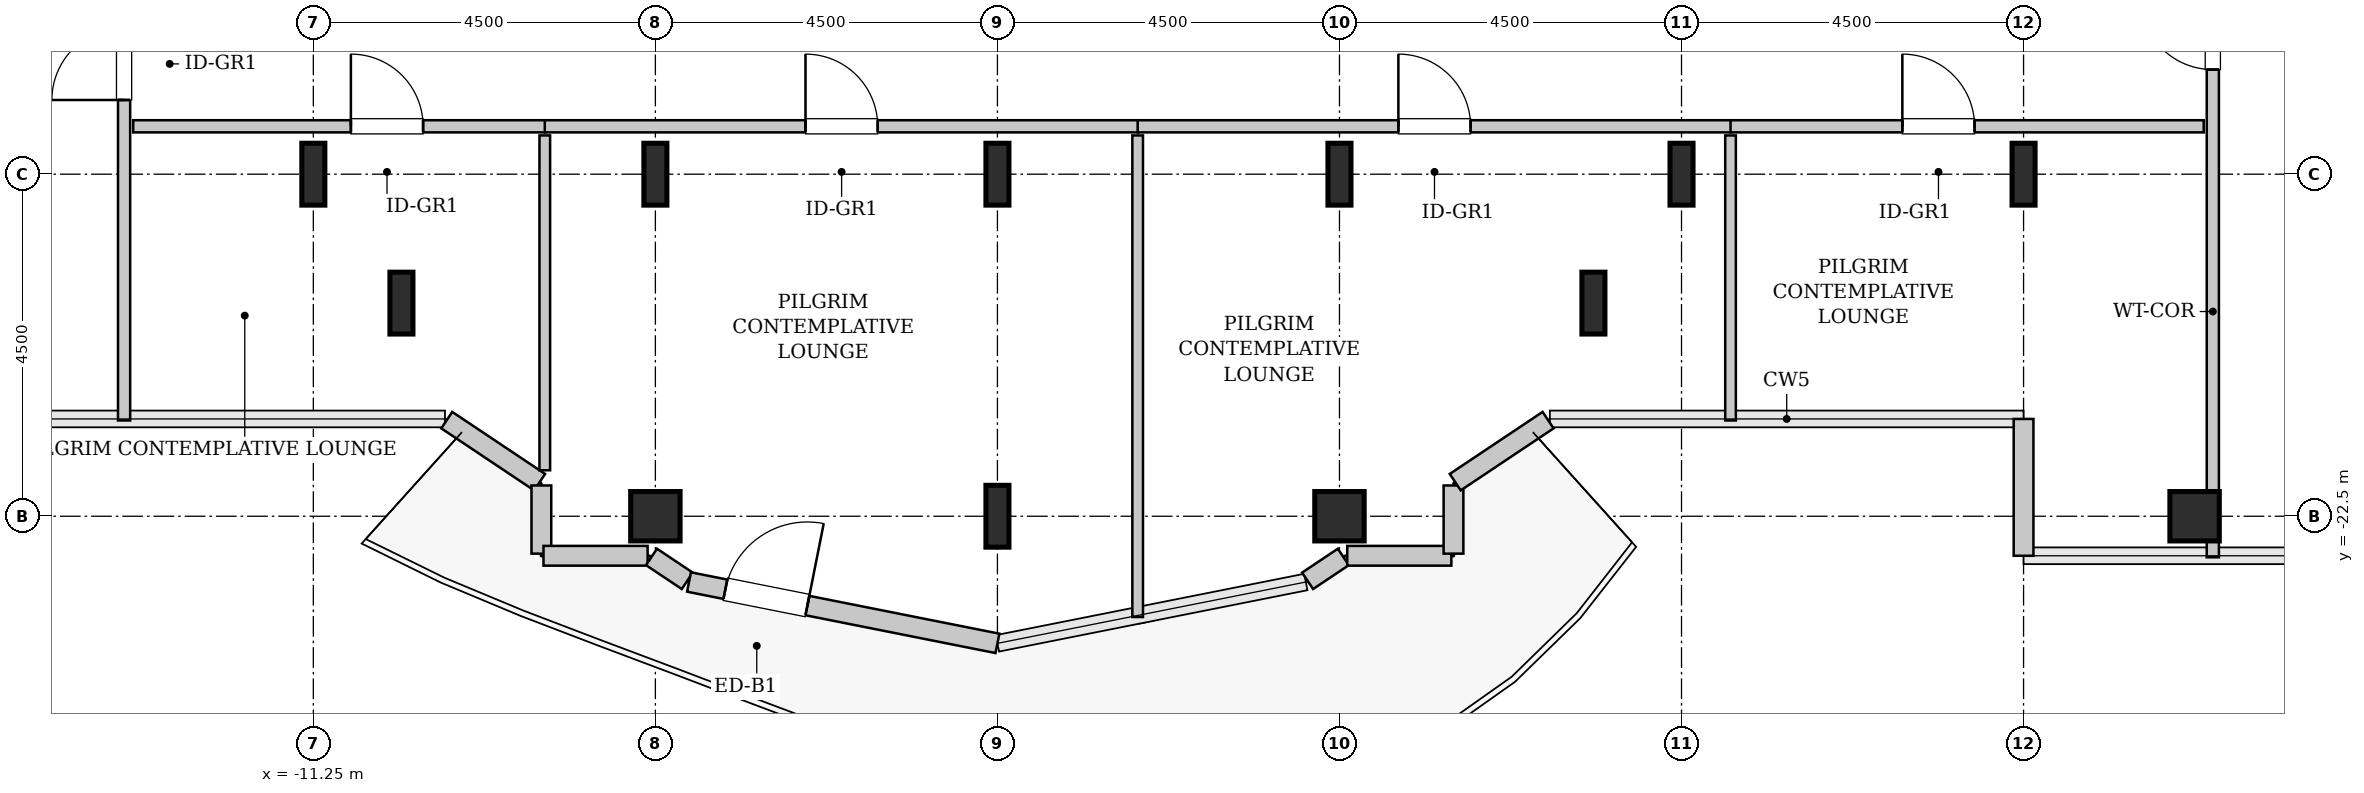
"""IFC4 building model, lengths in metres.
Left out: names, types, materials, properties, quantities, classifications, styles, units other than length and angle.
Written with IfcOpenShell. Run it as: python <this file> out.ifc"""

import sys

from ifc_helpers import new_model, si_unit, direction, frame, frame_2d, origin, origin_2d, place, context, subcontext, project, spatial, rectangle, hollow_rectangle, i_section, extrude, source, transform, mapped, element, fill, save


model = new_model("IFC4")
c1 = context("Model", 3, precision=1e-05, world=origin(), true_north=direction((0.0, 1.0)))
c2 = subcontext(c1, "Body", "Model", "MODEL_VIEW")
j1 = project(units=[si_unit("LENGTHUNIT", "METRE"), si_unit("PLANEANGLEUNIT", "RADIAN")], contexts=[c1])
p1 = place(None, origin())
s1 = spatial("IfcSite", under=j1, at=p1, CompositionType="ELEMENT")
p2 = place(p1, origin())
s2 = spatial("IfcBuilding", under=s1, at=p2, CompositionType="ELEMENT")
p3 = place(p2, frame((0.0, 0.0, 210.4)))
s3 = spatial("IfcBuildingStorey", under=s2, at=p3, CompositionType="ELEMENT", Elevation=210.4)
m1 = source(origin(), c2, "Body", "SweptSolid", [
    extrude(i_section(OverallWidth=0.303, OverallDepth=0.814, WebThickness=0.021, FlangeThickness=0.04, FilletRadius=0.03, at=origin_2d()), origin(), (0.0, 0.0, 1.0), 3.8),
])
for number, where, z_axis, x_axis in (
    (1, (-11.25, -18.0, 0.0), (0.0, 0.0, 1.0), (1.0, 0.0, 0.0)),
    (2, (-10.091, -19.696, 0.0), (0.0, 0.0, 1.0), (1.0, 0.0, 0.0)),
):
    element("IfcColumn", number, at=place(p3, frame(where, z_axis=z_axis, x_axis=x_axis)), inside=s3, PredefinedType="COLUMN", context=c2, shape_type="MappedRepresentation", body=[
        mapped(m1, transform((0.0, 0.0, 0.0), x_axis=(1.0, 0.0, 0.0), y_axis=(0.0, 1.0, 0.0), z_axis=(0.0, 0.0, 1.0), scale=1.0)),
    ])
m2 = source(origin(), c2, "Body", "SweptSolid", [
    extrude(hollow_rectangle(XDim=0.65, YDim=0.65, WallThickness=0.032, InnerFilletRadius=0.032, OuterFilletRadius=0.064, at=origin_2d()), origin(), (0.0, 0.0, 1.0), 3.8),
])
p4 = place(p3, frame((-6.75, -22.5, 0.0), z_axis=(0.0, 0.0, 1.0), x_axis=(1.0, 0.0, 0.0)))
e3 = element("IfcColumn", 3, at=p4, inside=s3, PredefinedType="COLUMN", context=c2, shape_type="MappedRepresentation", body=[
    mapped(m2, transform((0.0, 0.0, 0.0), x_axis=(1.0, 0.0, 0.0), y_axis=(0.0, 1.0, 0.0), z_axis=(0.0, 0.0, 1.0), scale=1.0)),
])
for number, where, z_axis, x_axis in (
    (4, (-6.75, -18.0, 0.0), (0.0, 0.0, 1.0), (1.0, 0.0, 0.0)),
    (5, (-2.25, -22.5, 0.0), (0.0, 0.0, 1.0), (1.0, 0.0, 0.0)),
    (6, (-2.25, -18.0, 0.0), (0.0, 0.0, 1.0), (1.0, 0.0, 0.0)),
):
    element("IfcColumn", number, at=place(p3, frame(where, z_axis=z_axis, x_axis=x_axis)), inside=s3, PredefinedType="COLUMN", context=c2, shape_type="MappedRepresentation", body=[
        mapped(m1, transform((0.0, 0.0, 0.0), x_axis=(1.0, 0.0, 0.0), y_axis=(0.0, 1.0, 0.0), z_axis=(0.0, 0.0, 1.0), scale=1.0)),
    ])
p5 = place(p3, frame((2.25, -22.5, 0.0), z_axis=(0.0, 0.0, 1.0), x_axis=(1.0, 0.0, 0.0)))
e7 = element("IfcColumn", 7, at=p5, inside=s3, PredefinedType="COLUMN", context=c2, shape_type="MappedRepresentation", body=[
    mapped(m2, transform((0.0, 0.0, 0.0), x_axis=(1.0, 0.0, 0.0), y_axis=(0.0, 1.0, 0.0), z_axis=(0.0, 0.0, 1.0), scale=1.0)),
])
for number, where, z_axis, x_axis in (
    (8, (2.25, -18.0, 0.0), (0.0, 0.0, 1.0), (1.0, 0.0, 0.0)),
    (9, (5.591, -19.696, 0.0), (0.0, 0.0, 1.0), (1.0, 0.0, 0.0)),
    (10, (6.75, -18.0, 0.0), (0.0, 0.0, 1.0), (1.0, 0.0, 0.0)),
    (11, (11.25, -18.0, 0.0), (0.0, 0.0, 1.0), (1.0, 0.0, 0.0)),
):
    element("IfcColumn", number, at=place(p3, frame(where, z_axis=z_axis, x_axis=x_axis)), inside=s3, PredefinedType="COLUMN", context=c2, shape_type="MappedRepresentation", body=[
        mapped(m1, transform((0.0, 0.0, 0.0), x_axis=(1.0, 0.0, 0.0), y_axis=(0.0, 1.0, 0.0), z_axis=(0.0, 0.0, 1.0), scale=1.0)),
    ])
p6 = place(p3, frame((13.5, -22.5, 0.0), z_axis=(0.0, 0.0, 1.0), x_axis=(1.0, 0.0, 0.0)))
e12 = element("IfcColumn", 12, at=p6, inside=s3, PredefinedType="COLUMN", context=c2, shape_type="MappedRepresentation", body=[
    mapped(m2, transform((0.0, 0.0, 0.0), x_axis=(1.0, 0.0, 0.0), y_axis=(0.0, 1.0, 0.0), z_axis=(0.0, 0.0, 1.0), scale=1.0)),
])
m3 = source(origin(), c2, "Body", "SweptSolid", [
    extrude(rectangle(XDim=1.8, YDim=0.26, at=frame_2d((0.9, 0.0))), origin(), (0.0, 0.0, 1.0), 3.55),
])
p7 = place(p3, frame((11.25, -21.22, 0.0), z_axis=(0.0, 0.0, 1.0), x_axis=(0.0, -1.0, 0.0)))
e13 = element("IfcWall", 13, at=p7, inside=s3, PredefinedType="SOLIDWALL", context=c2, shape_type="MappedRepresentation", body=[
    mapped(m3, transform((0.0, 0.0, 0.0), x_axis=(1.0, 0.0, 0.0), y_axis=(0.0, 1.0, 0.0), z_axis=(0.0, 0.0, 1.0), scale=1.0)),
])
m4 = source(origin(), c2, "Body", "SweptSolid", [
    extrude(rectangle(XDim=1.469, YDim=0.26, at=frame_2d((0.734, 0.0))), origin(), (0.0, 0.0, 1.0), 3.55),
])
p8 = place(p3, frame((-9.495, -21.236, 0.0), z_axis=(0.0, 0.0, 1.0), x_axis=(0.831461760506, -0.555581983884, 0.0)))
e14 = element("IfcWall", 14, at=p8, inside=s3, PredefinedType="SOLIDWALL", context=c2, shape_type="MappedRepresentation", body=[
    mapped(m4, transform((0.0, 0.0, 0.0), x_axis=(1.0, 0.0, 0.0), y_axis=(0.0, 1.0, 0.0), z_axis=(0.0, 0.0, 1.0), scale=1.0)),
])
m5 = source(origin(), c2, "Body", "SweptSolid", [
    extrude(rectangle(XDim=0.897, YDim=0.26, at=frame_2d((0.448, 0.0))), origin(), (0.0, 0.0, 1.0), 3.55),
])
p9 = place(p3, frame((-8.25, -22.095, 0.0), z_axis=(0.0, 0.0, 1.0), x_axis=(0.0, -1.0, 0.0)))
e15 = element("IfcWall", 15, at=p9, inside=s3, PredefinedType="SOLIDWALL", context=c2, shape_type="MappedRepresentation", body=[
    mapped(m5, transform((0.0, 0.0, 0.0), x_axis=(1.0, 0.0, 0.0), y_axis=(0.0, 1.0, 0.0), z_axis=(0.0, 0.0, 1.0), scale=1.0)),
])
m6 = source(origin(), c2, "Body", "SweptSolid", [
    extrude(rectangle(XDim=1.37, YDim=0.26, at=frame_2d((0.685, 0.0))), origin(), (0.0, 0.0, 1.0), 3.55),
])
p10 = place(p3, frame((-8.222, -23.02, 0.0), z_axis=(0.0, 0.0, 1.0), x_axis=(1.0, 0.0, 0.0)))
e16 = element("IfcWall", 16, at=p10, inside=s3, PredefinedType="SOLIDWALL", context=c2, shape_type="MappedRepresentation", body=[
    mapped(m6, transform((0.0, 0.0, 0.0), x_axis=(1.0, 0.0, 0.0), y_axis=(0.0, 1.0, 0.0), z_axis=(0.0, 0.0, 1.0), scale=1.0)),
])
m7 = source(origin(), c2, "Body", "SweptSolid", [
    extrude(rectangle(XDim=0.565, YDim=0.26, at=frame_2d((0.283, 0.0))), origin(), (0.0, 0.0, 1.0), 3.55),
])
p11 = place(p3, frame((-6.801, -23.036, 0.0), z_axis=(0.0, 0.0, 1.0), x_axis=(0.831651492666, -0.555297933317, 0.0)))
e17 = element("IfcWall", 17, at=p11, inside=s3, PredefinedType="SOLIDWALL", context=c2, shape_type="MappedRepresentation", body=[
    mapped(m7, transform((0.0, 0.0, 0.0), x_axis=(1.0, 0.0, 0.0), y_axis=(0.0, 1.0, 0.0), z_axis=(0.0, 0.0, 1.0), scale=1.0)),
])
m8 = source(origin(), c2, "Body", "SweptSolid", [
    extrude(rectangle(XDim=4.137, YDim=0.26, at=frame_2d((2.068, 0.0))), origin(), (0.0, 0.0, 1.0), 3.55),
])
p12 = place(p3, frame((-6.307, -23.365, 0.0), z_axis=(0.0, 0.0, 1.0), x_axis=(0.980782170794, -0.195105954428, 0.0)))
e18 = element("IfcWall", 18, at=p12, inside=s3, PredefinedType="SOLIDWALL", context=c2, shape_type="MappedRepresentation", body=[
    mapped(m8, transform((0.0, 0.0, 0.0), x_axis=(1.0, 0.0, 0.0), y_axis=(0.0, 1.0, 0.0), z_axis=(0.0, 0.0, 1.0), scale=1.0)),
])
p13 = place(p12, frame((0.488, 0.0, 0.0)))
e19 = element("IfcOpeningElement", 19, at=p13, cuts=e18, PredefinedType="OPENING", context=c2, shape_type="SweptSolid", body=[
    extrude(rectangle(XDim=1.1, YDim=2.2, at=frame_2d((0.55, 1.1))), frame((0.0, 0.14, 0.0), z_axis=(0.0, -1.0, 0.0), x_axis=(1.0, 0.0, 0.0)), (0.0, 0.0, 1.0), 0.28),
])
p14 = place(p3, frame((1.831, -23.35, 0.0), z_axis=(0.0, 0.0, 1.0), x_axis=(0.831651492666, 0.555297933317, 0.0)))
e20 = element("IfcWall", 20, at=p14, inside=s3, PredefinedType="SOLIDWALL", context=c2, shape_type="MappedRepresentation", body=[
    mapped(m7, transform((0.0, 0.0, 0.0), x_axis=(1.0, 0.0, 0.0), y_axis=(0.0, 1.0, 0.0), z_axis=(0.0, 0.0, 1.0), scale=1.0)),
])
p15 = place(p3, frame((2.352, -23.02, 0.0), z_axis=(0.0, 0.0, 1.0), x_axis=(1.0, 0.0, 0.0)))
e21 = element("IfcWall", 21, at=p15, inside=s3, PredefinedType="SOLIDWALL", context=c2, shape_type="MappedRepresentation", body=[
    mapped(m6, transform((0.0, 0.0, 0.0), x_axis=(1.0, 0.0, 0.0), y_axis=(0.0, 1.0, 0.0), z_axis=(0.0, 0.0, 1.0), scale=1.0)),
])
p16 = place(p3, frame((3.75, -22.992, 0.0), z_axis=(0.0, 0.0, 1.0), x_axis=(0.0, 1.0, 0.0)))
e22 = element("IfcWall", 22, at=p16, inside=s3, PredefinedType="SOLIDWALL", context=c2, shape_type="MappedRepresentation", body=[
    mapped(m5, transform((0.0, 0.0, 0.0), x_axis=(1.0, 0.0, 0.0), y_axis=(0.0, 1.0, 0.0), z_axis=(0.0, 0.0, 1.0), scale=1.0)),
])
p17 = place(p3, frame((3.773, -22.052, 0.0), z_axis=(0.0, 0.0, 1.0), x_axis=(0.831461760506, 0.555581983884, 0.0)))
e23 = element("IfcWall", 23, at=p17, inside=s3, PredefinedType="SOLIDWALL", context=c2, shape_type="MappedRepresentation", body=[
    mapped(m4, transform((0.0, 0.0, 0.0), x_axis=(1.0, 0.0, 0.0), y_axis=(0.0, 1.0, 0.0), z_axis=(0.0, 0.0, 1.0), scale=1.0)),
])
m9 = source(origin(), c2, "Body", "SweptSolid", [
    extrude(rectangle(XDim=5.552, YDim=0.16, at=frame_2d((2.776, 0.0))), origin(), (0.0, 0.0, 1.0), 3.535),
])
p18 = place(p3, frame((-13.74, -21.24, 0.0), z_axis=(0.0, 0.0, 1.0), x_axis=(0.0, 1.0, 0.0)))
e24 = element("IfcWall", 24, at=p18, inside=s3, PredefinedType="PARTITIONING", context=c2, shape_type="MappedRepresentation", body=[
    mapped(m9, transform((0.0, 0.0, 0.0), x_axis=(1.0, 0.0, 0.0), y_axis=(0.0, 1.0, 0.0), z_axis=(0.0, 0.0, 1.0), scale=1.0)),
])
p19 = place(p18, frame((4.216, 0.0, 0.0)))
e25 = element("IfcOpeningElement", 25, at=p19, cuts=e24, PredefinedType="OPENING", context=c2, shape_type="SweptSolid", body=[
    extrude(rectangle(XDim=0.95, YDim=2.1, at=frame_2d((0.475, 1.05))), frame((0.0, 0.09, 0.0), z_axis=(0.0, -1.0, 0.0), x_axis=(1.0, 0.0, 0.0)), (0.0, 0.0, 1.0), 0.18),
])
m10 = source(origin(), c2, "Body", "SweptSolid", [
    extrude(rectangle(XDim=8.153, YDim=0.16, at=frame_2d((4.076, 0.0))), origin(), (0.0, 0.0, 1.0), 3.535),
])
p20 = place(p3, frame((13.74, -23.04, 0.0), z_axis=(0.0, 0.0, 1.0), x_axis=(0.0, 1.0, 0.0)))
e26 = element("IfcWall", 26, at=p20, inside=s3, PredefinedType="PARTITIONING", context=c2, shape_type="MappedRepresentation", body=[
    mapped(m10, transform((0.0, 0.0, 0.0), x_axis=(1.0, 0.0, 0.0), y_axis=(0.0, 1.0, 0.0), z_axis=(0.0, 0.0, 1.0), scale=1.0)),
])
p21 = place(p20, frame((6.416, 0.0, 0.0)))
e27 = element("IfcOpeningElement", 27, at=p21, cuts=e26, PredefinedType="OPENING", context=c2, shape_type="SweptSolid", body=[
    extrude(rectangle(XDim=0.95, YDim=2.1, at=frame_2d((0.475, 1.05))), frame((0.0, 0.09, 0.0), z_axis=(0.0, -1.0, 0.0), x_axis=(1.0, 0.0, 0.0)), (0.0, 0.0, 1.0), 0.18),
])
m11 = source(origin(), c2, "Body", "SweptSolid", [
    extrude(rectangle(XDim=5.425, YDim=0.16, at=frame_2d((2.712, 0.0))), origin(), (0.0, 0.0, 1.0), 3.535),
])
p22 = place(p3, frame((-13.62, -17.37, 0.0), z_axis=(0.0, 0.0, 1.0), x_axis=(1.0, 0.0, 0.0)))
e28 = element("IfcWall", 28, at=p22, inside=s3, PredefinedType="PARTITIONING", context=c2, shape_type="MappedRepresentation", body=[
    mapped(m11, transform((0.0, 0.0, 0.0), x_axis=(1.0, 0.0, 0.0), y_axis=(0.0, 1.0, 0.0), z_axis=(0.0, 0.0, 1.0), scale=1.0)),
])
p23 = place(p22, frame((2.864, 0.0, 0.0)))
e29 = element("IfcOpeningElement", 29, at=p23, cuts=e28, PredefinedType="OPENING", context=c2, shape_type="SweptSolid", body=[
    extrude(rectangle(XDim=0.95, YDim=2.1, at=frame_2d((0.475, 1.05))), frame((0.0, 0.09, 0.0), z_axis=(0.0, -1.0, 0.0), x_axis=(1.0, 0.0, 0.0)), (0.0, 0.0, 1.0), 0.18),
])
m12 = source(origin(), c2, "Body", "SweptSolid", [
    extrude(rectangle(XDim=4.405, YDim=0.14, at=frame_2d((2.203, 0.0))), origin(), (0.0, 0.0, 1.0), 3.535),
])
p24 = place(p3, frame((-8.205, -21.895, 0.0), z_axis=(0.0, 0.0, 1.0), x_axis=(0.0, 1.0, 0.0)))
e30 = element("IfcWall", 30, at=p24, inside=s3, PredefinedType="PARTITIONING", context=c2, shape_type="MappedRepresentation", body=[
    mapped(m12, transform((0.0, 0.0, 0.0), x_axis=(1.0, 0.0, 0.0), y_axis=(0.0, 1.0, 0.0), z_axis=(0.0, 0.0, 1.0), scale=1.0)),
])
m13 = source(origin(), c2, "Body", "SweptSolid", [
    extrude(rectangle(XDim=7.81, YDim=0.16, at=frame_2d((3.905, 0.0))), origin(), (0.0, 0.0, 1.0), 3.535),
])
p25 = place(p3, frame((-8.205, -17.37, 0.0), z_axis=(0.0, 0.0, 1.0), x_axis=(1.0, 0.0, 0.0)))
e31 = element("IfcWall", 31, at=p25, inside=s3, PredefinedType="PARTITIONING", context=c2, shape_type="MappedRepresentation", body=[
    mapped(m13, transform((0.0, 0.0, 0.0), x_axis=(1.0, 0.0, 0.0), y_axis=(0.0, 1.0, 0.0), z_axis=(0.0, 0.0, 1.0), scale=1.0)),
])
p26 = place(p25, frame((3.43, 0.0, 0.0)))
e32 = element("IfcOpeningElement", 32, at=p26, cuts=e31, PredefinedType="OPENING", context=c2, shape_type="SweptSolid", body=[
    extrude(rectangle(XDim=0.95, YDim=2.1, at=frame_2d((0.475, 1.05))), frame((0.0, 0.09, 0.0), z_axis=(0.0, -1.0, 0.0), x_axis=(1.0, 0.0, 0.0)), (0.0, 0.0, 1.0), 0.18),
])
m14 = source(origin(), c2, "Body", "SweptSolid", [
    extrude(rectangle(XDim=6.336, YDim=0.14, at=frame_2d((3.168, 0.0))), origin(), (0.0, 0.0, 1.0), 3.535),
])
p27 = place(p3, frame((-0.405, -23.826, 0.0), z_axis=(0.0, 0.0, 1.0), x_axis=(0.0, 1.0, 0.0)))
e33 = element("IfcWall", 33, at=p27, inside=s3, PredefinedType="PARTITIONING", context=c2, shape_type="MappedRepresentation", body=[
    mapped(m14, transform((0.0, 0.0, 0.0), x_axis=(1.0, 0.0, 0.0), y_axis=(0.0, 1.0, 0.0), z_axis=(0.0, 0.0, 1.0), scale=1.0)),
])
p28 = place(p3, frame((-0.405, -17.37, 0.0), z_axis=(0.0, 0.0, 1.0), x_axis=(1.0, 0.0, 0.0)))
e34 = element("IfcWall", 34, at=p28, inside=s3, PredefinedType="PARTITIONING", context=c2, shape_type="MappedRepresentation", body=[
    mapped(m13, transform((0.0, 0.0, 0.0), x_axis=(1.0, 0.0, 0.0), y_axis=(0.0, 1.0, 0.0), z_axis=(0.0, 0.0, 1.0), scale=1.0)),
])
p29 = place(p28, frame((3.43, 0.0, 0.0)))
e35 = element("IfcOpeningElement", 35, at=p29, cuts=e34, PredefinedType="OPENING", context=c2, shape_type="SweptSolid", body=[
    extrude(rectangle(XDim=0.95, YDim=2.1, at=frame_2d((0.475, 1.05))), frame((0.0, 0.09, 0.0), z_axis=(0.0, -1.0, 0.0), x_axis=(1.0, 0.0, 0.0)), (0.0, 0.0, 1.0), 0.18),
])
m15 = source(origin(), c2, "Body", "SweptSolid", [
    extrude(rectangle(XDim=3.75, YDim=0.14, at=frame_2d((1.875, 0.0))), origin(), (0.0, 0.0, 1.0), 3.535),
])
p30 = place(p3, frame((7.395, -21.24, 0.0), z_axis=(0.0, 0.0, 1.0), x_axis=(0.0, 1.0, 0.0)))
e36 = element("IfcWall", 36, at=p30, inside=s3, PredefinedType="PARTITIONING", context=c2, shape_type="MappedRepresentation", body=[
    mapped(m15, transform((0.0, 0.0, 0.0), x_axis=(1.0, 0.0, 0.0), y_axis=(0.0, 1.0, 0.0), z_axis=(0.0, 0.0, 1.0), scale=1.0)),
])
m16 = source(origin(), c2, "Body", "SweptSolid", [
    extrude(rectangle(XDim=6.225, YDim=0.16, at=frame_2d((3.113, 0.0))), origin(), (0.0, 0.0, 1.0), 3.535),
])
p31 = place(p3, frame((7.395, -17.37, 0.0), z_axis=(0.0, 0.0, 1.0), x_axis=(1.0, 0.0, 0.0)))
e37 = element("IfcWall", 37, at=p31, inside=s3, PredefinedType="PARTITIONING", context=c2, shape_type="MappedRepresentation", body=[
    mapped(m16, transform((0.0, 0.0, 0.0), x_axis=(1.0, 0.0, 0.0), y_axis=(0.0, 1.0, 0.0), z_axis=(0.0, 0.0, 1.0), scale=1.0)),
])
p32 = place(p31, frame((2.26, 0.0, 0.0)))
e38 = element("IfcOpeningElement", 38, at=p32, cuts=e37, PredefinedType="OPENING", context=c2, shape_type="SweptSolid", body=[
    extrude(rectangle(XDim=0.95, YDim=2.1, at=frame_2d((0.475, 1.05))), frame((0.0, 0.09, 0.0), z_axis=(0.0, -1.0, 0.0), x_axis=(1.0, 0.0, 0.0)), (0.0, 0.0, 1.0), 0.18),
])
m17 = source(origin(), c2, "Body", "SweptSolid", [
    extrude(rectangle(XDim=1.1, YDim=2.2, at=frame_2d((0.55, 1.1))), frame((0.0, 0.025, 0.0), z_axis=(0.0, -1.0, 0.0), x_axis=(1.0, 0.0, 0.0)), (0.0, 0.0, 1.0), 0.05),
])
p33 = place(p13, origin())
e39 = element("IfcDoor", 39, at=p33, inside=s3, OperationType="SINGLE_SWING_RIGHT", PredefinedType="DOOR", context=c2, shape_type="MappedRepresentation", body=[
    mapped(m17, transform((0.0, 0.0, 0.0), x_axis=(1.0, 0.0, 0.0), y_axis=(0.0, 1.0, 0.0), z_axis=(0.0, 0.0, 1.0), scale=1.0)),
])
fill(e19, e39)
m18 = source(origin(), c2, "Body", "SweptSolid", [
    extrude(rectangle(XDim=0.95, YDim=2.1, at=frame_2d((0.475, 1.05))), frame((0.0, 0.025, 0.0), z_axis=(0.0, -1.0, 0.0), x_axis=(1.0, 0.0, 0.0)), (0.0, 0.0, 1.0), 0.05),
])
p34 = place(p19, origin())
e40 = element("IfcDoor", 40, at=p34, inside=s3, OperationType="SINGLE_SWING_LEFT", PredefinedType="DOOR", context=c2, shape_type="MappedRepresentation", body=[
    mapped(m18, transform((0.0, 0.0, 0.0), x_axis=(1.0, 0.0, 0.0), y_axis=(0.0, 1.0, 0.0), z_axis=(0.0, 0.0, 1.0), scale=1.0)),
])
fill(e25, e40)
p35 = place(p21, origin())
e41 = element("IfcDoor", 41, at=p35, inside=s3, OperationType="SINGLE_SWING_RIGHT", PredefinedType="DOOR", context=c2, shape_type="MappedRepresentation", body=[
    mapped(m18, transform((0.0, 0.0, 0.0), x_axis=(1.0, 0.0, 0.0), y_axis=(0.0, 1.0, 0.0), z_axis=(0.0, 0.0, 1.0), scale=1.0)),
])
fill(e27, e41)
p36 = place(p23, origin())
e42 = element("IfcDoor", 42, at=p36, inside=s3, OperationType="SINGLE_SWING_LEFT", PredefinedType="DOOR", context=c2, shape_type="MappedRepresentation", body=[
    mapped(m18, transform((0.0, 0.0, 0.0), x_axis=(1.0, 0.0, 0.0), y_axis=(0.0, 1.0, 0.0), z_axis=(0.0, 0.0, 1.0), scale=1.0)),
])
fill(e29, e42)
p37 = place(p26, origin())
e43 = element("IfcDoor", 43, at=p37, inside=s3, OperationType="SINGLE_SWING_LEFT", PredefinedType="DOOR", context=c2, shape_type="MappedRepresentation", body=[
    mapped(m18, transform((0.0, 0.0, 0.0), x_axis=(1.0, 0.0, 0.0), y_axis=(0.0, 1.0, 0.0), z_axis=(0.0, 0.0, 1.0), scale=1.0)),
])
fill(e32, e43)
p38 = place(p29, origin())
e44 = element("IfcDoor", 44, at=p38, inside=s3, OperationType="SINGLE_SWING_LEFT", PredefinedType="DOOR", context=c2, shape_type="MappedRepresentation", body=[
    mapped(m18, transform((0.0, 0.0, 0.0), x_axis=(1.0, 0.0, 0.0), y_axis=(0.0, 1.0, 0.0), z_axis=(0.0, 0.0, 1.0), scale=1.0)),
])
fill(e35, e44)
p39 = place(p32, origin())
e45 = element("IfcDoor", 45, at=p39, inside=s3, OperationType="SINGLE_SWING_LEFT", PredefinedType="DOOR", context=c2, shape_type="MappedRepresentation", body=[
    mapped(m18, transform((0.0, 0.0, 0.0), x_axis=(1.0, 0.0, 0.0), y_axis=(0.0, 1.0, 0.0), z_axis=(0.0, 0.0, 1.0), scale=1.0)),
])
fill(e38, e45)
save(model, sys.argv[1])
